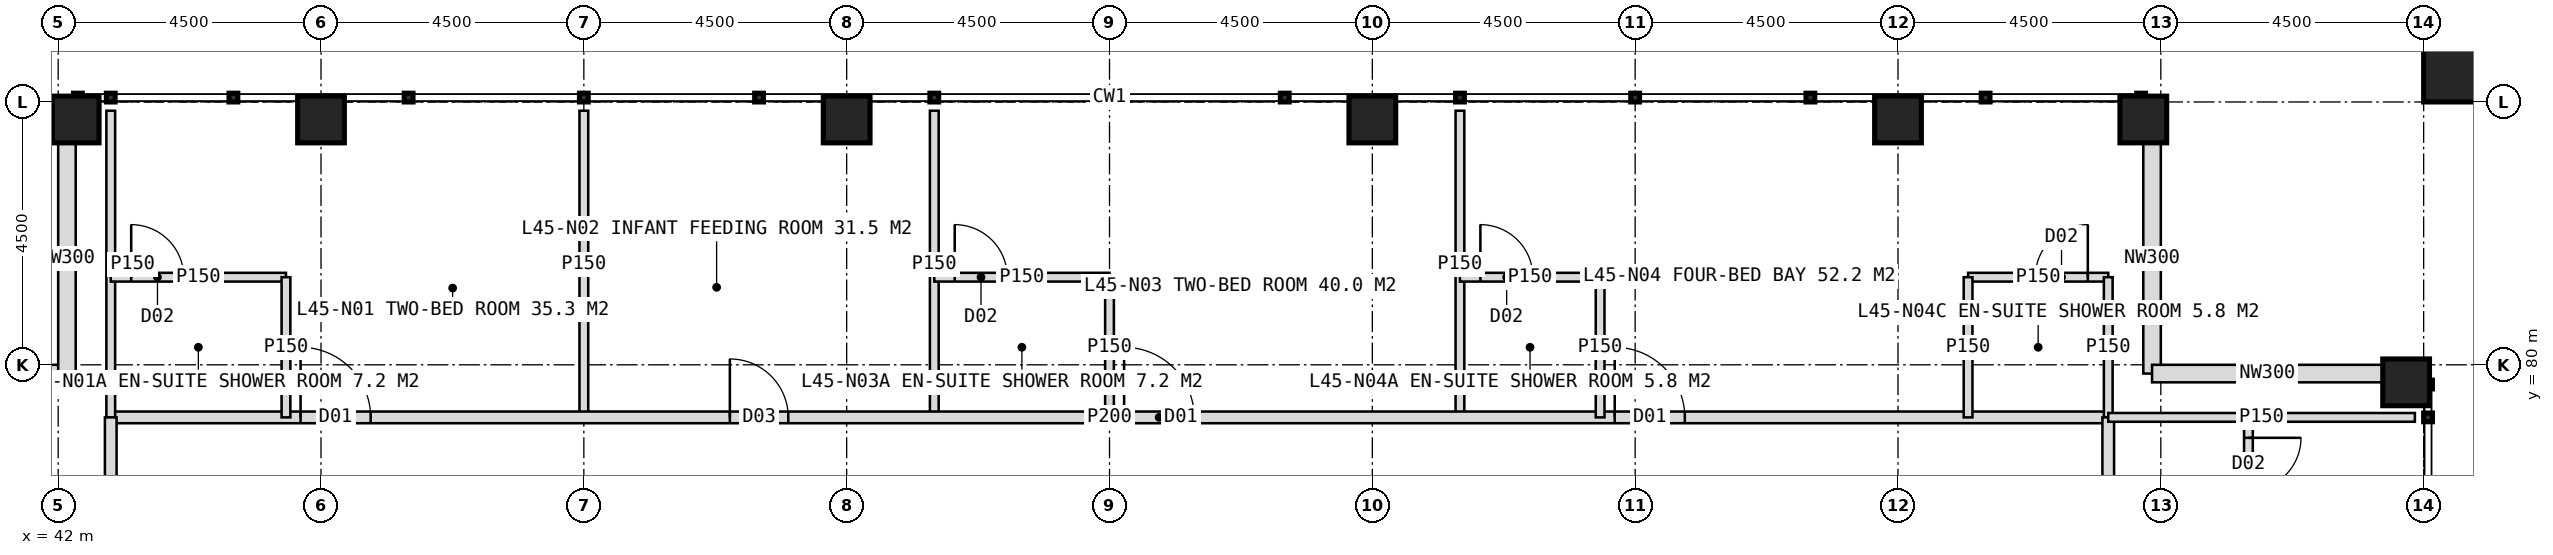
"""IFC4 building model, lengths in metres.
Left out: names, types, materials, properties, quantities, classifications, styles, units other than length and angle.
Written with IfcOpenShell. Run it as: python <this file> out.ifc"""

import sys

from ifc_helpers import new_model, si_unit, direction, frame, frame_2d, origin, origin_2d, place, context, subcontext, project, spatial, rectangle, hollow_rectangle, extrude, element, fill, save


model = new_model("IFC4")
c1 = context("Model", 3, precision=1e-05, world=origin(), true_north=direction((0.0, 1.0)))
c2 = subcontext(c1, "Body", "Model", "MODEL_VIEW")
j1 = project(units=[si_unit("LENGTHUNIT", "METRE"), si_unit("PLANEANGLEUNIT", "RADIAN")], contexts=[c1])
p1 = place(None, origin())
s1 = spatial("IfcSite", under=j1, at=p1, CompositionType="ELEMENT")
p2 = place(p1, origin())
s2 = spatial("IfcBuilding", under=s1, at=p2, CompositionType="ELEMENT")
p3 = place(p2, frame((0.0, 0.0, 189.0)))
s3 = spatial("IfcBuildingStorey", under=s2, at=p3, CompositionType="ELEMENT", Elevation=189.0)
for number, where, z_axis, x_axis in (
    (1, (42.3, 84.2, 0.0), (0.0, 0.0, 1.0), (1.0, 0.0, 0.0)),
    (2, (46.5, 84.2, 0.0), (0.0, 0.0, 1.0), (1.0, 0.0, 0.0)),
    (3, (55.5, 84.2, 0.0), (0.0, 0.0, 1.0), (1.0, 0.0, 0.0)),
    (4, (64.5, 84.2, 0.0), (0.0, 0.0, 1.0), (1.0, 0.0, 0.0)),
    (5, (73.5, 84.2, 0.0), (0.0, 0.0, 1.0), (1.0, 0.0, 0.0)),
    (6, (77.7, 84.2, 0.0), (0.0, 0.0, 1.0), (1.0, 0.0, 0.0)),
    (7, (82.2, 79.7, 0.0), (0.0, 0.0, 1.0), (1.0, 0.0, 0.0)),
):
    element("IfcColumn", number, at=place(p3, frame(where, z_axis=z_axis, x_axis=x_axis)), inside=s3, PredefinedType="COLUMN", context=c2, shape_type="SweptSolid", body=[
        extrude(hollow_rectangle(XDim=0.8, YDim=0.8, WallThickness=0.08, at=origin_2d()), origin(), (0.0, 0.0, 1.0), 4.0),
    ])
p4 = place(p3, frame((83.1, 85.1, 0.0), z_axis=(0.0, 0.0, 1.0), x_axis=(1.0, 0.0, 0.0)))
e8 = element("IfcColumn", 8, at=p4, inside=s3, PredefinedType="COLUMN", context=c2, shape_type="SweptSolid", body=[
    extrude(hollow_rectangle(XDim=1.2, YDim=1.2, WallThickness=0.07, at=origin_2d()), origin(), (0.0, 0.0, 1.0), 4.0),
])
for number, where, z_axis, x_axis in (
    (9, (77.85, 83.8, 0.0), (0.0, 0.0, 1.0), (0.0, -1.0, 0.0)),
    (10, (77.85, 79.85, 0.0), (0.0, 0.0, 1.0), (1.0, 0.0, 0.0)),
    (11, (38.2, 79.85, 0.0), (0.0, 0.0, 1.0), (1.0, 0.0, 0.0)),
    (12, (42.15, 79.85, 0.0), (0.0, 0.0, 1.0), (0.0, 1.0, 0.0)),
):
    element("IfcWall", number, at=place(p3, frame(where, z_axis=z_axis, x_axis=x_axis)), inside=s3, PredefinedType="ELEMENTEDWALL", context=c2, shape_type="SweptSolid", body=[
        extrude(rectangle(XDim=3.95, YDim=0.3, at=frame_2d((1.975, 0.0))), origin(), (0.0, 0.0, 1.0), 2.85),
    ])
for number, where, z_axis, x_axis in (
    (13, (51.0, 79.1, 0.0), (0.0, 0.0, 1.0), (0.0, 1.0, 0.0)),
    (14, (57.0, 79.1, 0.0), (0.0, 0.0, 1.0), (0.0, 1.0, 0.0)),
    (15, (66.0, 79.1, 0.0), (0.0, 0.0, 1.0), (0.0, 1.0, 0.0)),
):
    element("IfcWall", number, at=place(p3, frame(where, z_axis=z_axis, x_axis=x_axis)), inside=s3, PredefinedType="PARTITIONING", context=c2, shape_type="SweptSolid", body=[
        extrude(rectangle(XDim=5.25, YDim=0.15, at=frame_2d((2.625, 0.0))), origin(), (0.0, 0.0, 1.0), 3.75),
    ])
p5 = place(p3, frame((42.9, 79.1, 0.0), z_axis=(0.0, 0.0, 1.0), x_axis=(1.0, 0.0, 0.0)))
e16 = element("IfcWall", 16, at=p5, inside=s3, PredefinedType="PARTITIONING", context=c2, shape_type="SweptSolid", body=[
    extrude(rectangle(XDim=34.2, YDim=0.2, at=frame_2d((17.1, 0.0))), origin(), (0.0, 0.0, 1.0), 3.75),
])
p6 = place(p5, frame((3.25, 0.0, 0.0)))
e17 = element("IfcOpeningElement", 17, at=p6, cuts=e16, PredefinedType="OPENING", context=c2, shape_type="SweptSolid", body=[
    extrude(rectangle(XDim=1.2, YDim=2.2, at=frame_2d((0.6, 1.1))), frame((0.0, 0.11, 0.0), z_axis=(0.0, -1.0, 0.0), x_axis=(1.0, 0.0, 0.0)), (0.0, 0.0, 1.0), 0.22),
])
p7 = place(p5, frame((10.6, 0.0, 0.0)))
e18 = element("IfcOpeningElement", 18, at=p7, cuts=e16, PredefinedType="OPENING", context=c2, shape_type="SweptSolid", body=[
    extrude(rectangle(XDim=1.0, YDim=2.1, at=frame_2d((0.5, 1.05))), frame((0.0, 0.11, 0.0), z_axis=(0.0, -1.0, 0.0), x_axis=(1.0, 0.0, 0.0)), (0.0, 0.0, 1.0), 0.22),
])
p8 = place(p5, frame((17.35, 0.0, 0.0)))
e19 = element("IfcOpeningElement", 19, at=p8, cuts=e16, PredefinedType="OPENING", context=c2, shape_type="SweptSolid", body=[
    extrude(rectangle(XDim=1.2, YDim=2.2, at=frame_2d((0.6, 1.1))), frame((0.0, 0.11, 0.0), z_axis=(0.0, -1.0, 0.0), x_axis=(1.0, 0.0, 0.0)), (0.0, 0.0, 1.0), 0.22),
])
p9 = place(p5, frame((25.75, 0.0, 0.0)))
e20 = element("IfcOpeningElement", 20, at=p9, cuts=e16, PredefinedType="OPENING", context=c2, shape_type="SweptSolid", body=[
    extrude(rectangle(XDim=1.2, YDim=2.2, at=frame_2d((0.6, 1.1))), frame((0.0, 0.11, 0.0), z_axis=(0.0, -1.0, 0.0), x_axis=(1.0, 0.0, 0.0)), (0.0, 0.0, 1.0), 0.22),
])
p10 = place(p3, frame((42.9, 79.1, 0.0), z_axis=(0.0, 0.0, 1.0), x_axis=(0.0, 1.0, 0.0)))
e21 = element("IfcWall", 21, at=p10, inside=s3, PredefinedType="PARTITIONING", context=c2, shape_type="SweptSolid", body=[
    extrude(rectangle(XDim=5.25, YDim=0.15, at=frame_2d((2.625, 0.0))), origin(), (0.0, 0.0, 1.0), 3.75),
])
p11 = place(p3, frame((42.9, 81.5, 0.0), z_axis=(0.0, 0.0, 1.0), x_axis=(1.0, 0.0, 0.0)))
e22 = element("IfcWall", 22, at=p11, inside=s3, PredefinedType="PARTITIONING", context=c2, shape_type="SweptSolid", body=[
    extrude(rectangle(XDim=3.0, YDim=0.15, at=frame_2d((1.5, 0.0))), origin(), (0.0, 0.0, 1.0), 3.75),
])
p12 = place(p11, frame((0.35, 0.0, 0.0)))
e23 = element("IfcOpeningElement", 23, at=p12, cuts=e22, PredefinedType="OPENING", context=c2, shape_type="SweptSolid", body=[
    extrude(rectangle(XDim=0.9, YDim=2.1, at=frame_2d((0.45, 1.05))), frame((0.0, 0.085, 0.0), z_axis=(0.0, -1.0, 0.0), x_axis=(1.0, 0.0, 0.0)), (0.0, 0.0, 1.0), 0.17),
])
p13 = place(p3, frame((45.9, 79.1, 0.0), z_axis=(0.0, 0.0, 1.0), x_axis=(0.0, 1.0, 0.0)))
e24 = element("IfcWall", 24, at=p13, inside=s3, PredefinedType="PARTITIONING", context=c2, shape_type="SweptSolid", body=[
    extrude(rectangle(XDim=2.4, YDim=0.15, at=frame_2d((1.2, 0.0))), origin(), (0.0, 0.0, 1.0), 3.75),
])
p14 = place(p3, frame((57.0, 81.5, 0.0), z_axis=(0.0, 0.0, 1.0), x_axis=(1.0, 0.0, 0.0)))
e25 = element("IfcWall", 25, at=p14, inside=s3, PredefinedType="PARTITIONING", context=c2, shape_type="SweptSolid", body=[
    extrude(rectangle(XDim=3.0, YDim=0.15, at=frame_2d((1.5, 0.0))), origin(), (0.0, 0.0, 1.0), 3.75),
])
p15 = place(p14, frame((0.35, 0.0, 0.0)))
e26 = element("IfcOpeningElement", 26, at=p15, cuts=e25, PredefinedType="OPENING", context=c2, shape_type="SweptSolid", body=[
    extrude(rectangle(XDim=0.9, YDim=2.1, at=frame_2d((0.45, 1.05))), frame((0.0, 0.085, 0.0), z_axis=(0.0, -1.0, 0.0), x_axis=(1.0, 0.0, 0.0)), (0.0, 0.0, 1.0), 0.17),
])
p16 = place(p3, frame((60.0, 79.1, 0.0), z_axis=(0.0, 0.0, 1.0), x_axis=(0.0, 1.0, 0.0)))
e27 = element("IfcWall", 27, at=p16, inside=s3, PredefinedType="PARTITIONING", context=c2, shape_type="SweptSolid", body=[
    extrude(rectangle(XDim=2.4, YDim=0.15, at=frame_2d((1.2, 0.0))), origin(), (0.0, 0.0, 1.0), 2.95),
])
p17 = place(p3, frame((66.0, 81.5, 0.0), z_axis=(0.0, 0.0, 1.0), x_axis=(1.0, 0.0, 0.0)))
e28 = element("IfcWall", 28, at=p17, inside=s3, PredefinedType="PARTITIONING", context=c2, shape_type="SweptSolid", body=[
    extrude(rectangle(XDim=2.4, YDim=0.15, at=frame_2d((1.2, 0.0))), origin(), (0.0, 0.0, 1.0), 3.75),
])
p18 = place(p17, frame((0.35, 0.0, 0.0)))
e29 = element("IfcOpeningElement", 29, at=p18, cuts=e28, PredefinedType="OPENING", context=c2, shape_type="SweptSolid", body=[
    extrude(rectangle(XDim=0.9, YDim=2.1, at=frame_2d((0.45, 1.05))), frame((0.0, 0.085, 0.0), z_axis=(0.0, -1.0, 0.0), x_axis=(1.0, 0.0, 0.0)), (0.0, 0.0, 1.0), 0.17),
])
p19 = place(p3, frame((68.4, 79.1, 0.0), z_axis=(0.0, 0.0, 1.0), x_axis=(0.0, 1.0, 0.0)))
e30 = element("IfcWall", 30, at=p19, inside=s3, PredefinedType="PARTITIONING", context=c2, shape_type="SweptSolid", body=[
    extrude(rectangle(XDim=2.4, YDim=0.15, at=frame_2d((1.2, 0.0))), origin(), (0.0, 0.0, 1.0), 3.75),
])
p20 = place(p3, frame((74.7, 81.5, 0.0), z_axis=(0.0, 0.0, 1.0), x_axis=(1.0, 0.0, 0.0)))
e31 = element("IfcWall", 31, at=p20, inside=s3, PredefinedType="PARTITIONING", context=c2, shape_type="SweptSolid", body=[
    extrude(rectangle(XDim=2.4, YDim=0.15, at=frame_2d((1.2, 0.0))), origin(), (0.0, 0.0, 1.0), 3.75),
])
p21 = place(p20, frame((1.15, 0.0, 0.0)))
e32 = element("IfcOpeningElement", 32, at=p21, cuts=e31, PredefinedType="OPENING", context=c2, shape_type="SweptSolid", body=[
    extrude(rectangle(XDim=0.9, YDim=2.1, at=frame_2d((0.45, 1.05))), frame((0.0, 0.085, 0.0), z_axis=(0.0, -1.0, 0.0), x_axis=(1.0, 0.0, 0.0)), (0.0, 0.0, 1.0), 0.17),
])
for number, where, z_axis, x_axis in (
    (33, (74.7, 79.1, 0.0), (0.0, 0.0, 1.0), (0.0, 1.0, 0.0)),
    (34, (77.1, 79.1, 0.0), (0.0, 0.0, 1.0), (0.0, 1.0, 0.0)),
):
    element("IfcWall", number, at=place(p3, frame(where, z_axis=z_axis, x_axis=x_axis)), inside=s3, PredefinedType="PARTITIONING", context=c2, shape_type="SweptSolid", body=[
        extrude(rectangle(XDim=2.4, YDim=0.15, at=frame_2d((1.2, 0.0))), origin(), (0.0, 0.0, 1.0), 3.75),
    ])
p22 = place(p3, frame((42.9, 44.9, 0.0), z_axis=(0.0, 0.0, 1.0), x_axis=(0.0, 1.0, 0.0)))
e35 = element("IfcWall", 35, at=p22, inside=s3, PredefinedType="PARTITIONING", context=c2, shape_type="SweptSolid", body=[
    extrude(rectangle(XDim=34.2, YDim=0.2, at=frame_2d((17.1, 0.0))), origin(), (0.0, 0.0, 1.0), 3.75),
])
p23 = place(p22, frame((3.25, 0.0, 0.0)))
e36 = element("IfcOpeningElement", 36, at=p23, cuts=e35, PredefinedType="OPENING", context=c2, shape_type="SweptSolid", body=[
    extrude(rectangle(XDim=1.2, YDim=2.2, at=frame_2d((0.6, 1.1))), frame((0.0, 0.11, 0.0), z_axis=(0.0, -1.0, 0.0), x_axis=(1.0, 0.0, 0.0)), (0.0, 0.0, 1.0), 0.22),
])
p24 = place(p22, frame((11.35, 0.0, 0.0)))
e37 = element("IfcOpeningElement", 37, at=p24, cuts=e35, PredefinedType="OPENING", context=c2, shape_type="SweptSolid", body=[
    extrude(rectangle(XDim=1.2, YDim=2.2, at=frame_2d((0.6, 1.1))), frame((0.0, 0.11, 0.0), z_axis=(0.0, -1.0, 0.0), x_axis=(1.0, 0.0, 0.0)), (0.0, 0.0, 1.0), 0.22),
])
p25 = place(p22, frame((20.35, 0.0, 0.0)))
e38 = element("IfcOpeningElement", 38, at=p25, cuts=e35, PredefinedType="OPENING", context=c2, shape_type="SweptSolid", body=[
    extrude(rectangle(XDim=1.2, YDim=2.2, at=frame_2d((0.6, 1.1))), frame((0.0, 0.11, 0.0), z_axis=(0.0, -1.0, 0.0), x_axis=(1.0, 0.0, 0.0)), (0.0, 0.0, 1.0), 0.22),
])
p26 = place(p22, frame((29.35, 0.0, 0.0)))
e39 = element("IfcOpeningElement", 39, at=p26, cuts=e35, PredefinedType="OPENING", context=c2, shape_type="SweptSolid", body=[
    extrude(rectangle(XDim=1.2, YDim=2.2, at=frame_2d((0.6, 1.1))), frame((0.0, 0.11, 0.0), z_axis=(0.0, -1.0, 0.0), x_axis=(1.0, 0.0, 0.0)), (0.0, 0.0, 1.0), 0.22),
])
p27 = place(p3, frame((77.1, 79.1, 0.0), z_axis=(0.0, 0.0, 1.0), x_axis=(0.0, -1.0, 0.0)))
e40 = element("IfcWall", 40, at=p27, inside=s3, PredefinedType="PARTITIONING", context=c2, shape_type="SweptSolid", body=[
    extrude(rectangle(XDim=34.2, YDim=0.2, at=frame_2d((17.1, 0.0))), origin(), (0.0, 0.0, 1.0), 3.75),
])
p28 = place(p27, frame((3.25, 0.0, 0.0)))
e41 = element("IfcOpeningElement", 41, at=p28, cuts=e40, PredefinedType="OPENING", context=c2, shape_type="SweptSolid", body=[
    extrude(rectangle(XDim=1.2, YDim=2.2, at=frame_2d((0.6, 1.1))), frame((0.0, 0.11, 0.0), z_axis=(0.0, -1.0, 0.0), x_axis=(1.0, 0.0, 0.0)), (0.0, 0.0, 1.0), 0.22),
])
p29 = place(p27, frame((11.35, 0.0, 0.0)))
e42 = element("IfcOpeningElement", 42, at=p29, cuts=e40, PredefinedType="OPENING", context=c2, shape_type="SweptSolid", body=[
    extrude(rectangle(XDim=1.2, YDim=2.2, at=frame_2d((0.6, 1.1))), frame((0.0, 0.11, 0.0), z_axis=(0.0, -1.0, 0.0), x_axis=(1.0, 0.0, 0.0)), (0.0, 0.0, 1.0), 0.22),
])
p30 = place(p27, frame((19.75, 0.0, 0.0)))
e43 = element("IfcOpeningElement", 43, at=p30, cuts=e40, PredefinedType="OPENING", context=c2, shape_type="SweptSolid", body=[
    extrude(rectangle(XDim=1.2, YDim=2.2, at=frame_2d((0.6, 1.1))), frame((0.0, 0.11, 0.0), z_axis=(0.0, -1.0, 0.0), x_axis=(1.0, 0.0, 0.0)), (0.0, 0.0, 1.0), 0.22),
])
p31 = place(p27, frame((25.75, 0.0, 0.0)))
e44 = element("IfcOpeningElement", 44, at=p31, cuts=e40, PredefinedType="OPENING", context=c2, shape_type="SweptSolid", body=[
    extrude(rectangle(XDim=1.2, YDim=2.2, at=frame_2d((0.6, 1.1))), frame((0.0, 0.11, 0.0), z_axis=(0.0, -1.0, 0.0), x_axis=(1.0, 0.0, 0.0)), (0.0, 0.0, 1.0), 0.22),
])
p32 = place(p3, frame((77.1, 79.1, 0.0), z_axis=(0.0, 0.0, 1.0), x_axis=(1.0, 0.0, 0.0)))
e45 = element("IfcWall", 45, at=p32, inside=s3, PredefinedType="PARTITIONING", context=c2, shape_type="SweptSolid", body=[
    extrude(rectangle(XDim=5.25, YDim=0.15, at=frame_2d((2.625, 0.0))), origin(), (0.0, 0.0, 1.0), 3.75),
])
p33 = place(p3, frame((79.5, 79.1, 0.0), z_axis=(0.0, 0.0, 1.0), x_axis=(0.0, -1.0, 0.0)))
e46 = element("IfcWall", 46, at=p33, inside=s3, PredefinedType="PARTITIONING", context=c2, shape_type="SweptSolid", body=[
    extrude(rectangle(XDim=3.0, YDim=0.15, at=frame_2d((1.5, 0.0))), origin(), (0.0, 0.0, 1.0), 3.75),
])
p34 = place(p33, frame((0.35, 0.0, 0.0)))
e47 = element("IfcOpeningElement", 47, at=p34, cuts=e46, PredefinedType="OPENING", context=c2, shape_type="SweptSolid", body=[
    extrude(rectangle(XDim=0.9, YDim=2.1, at=frame_2d((0.45, 1.05))), frame((0.0, 0.085, 0.0), z_axis=(0.0, -1.0, 0.0), x_axis=(1.0, 0.0, 0.0)), (0.0, 0.0, 1.0), 0.17),
])
p35 = place(p6, origin())
e48 = element("IfcDoor", 48, at=p35, inside=s3, OperationType="SINGLE_SWING_LEFT", PredefinedType="DOOR", context=c2, shape_type="SweptSolid", body=[
    extrude(rectangle(XDim=1.2, YDim=2.2, at=frame_2d((0.6, 1.1))), frame((0.0, 0.025, 0.0), z_axis=(0.0, -1.0, 0.0), x_axis=(1.0, 0.0, 0.0)), (0.0, 0.0, 1.0), 0.05),
])
fill(e17, e48)
p36 = place(p12, origin())
e49 = element("IfcDoor", 49, at=p36, inside=s3, OperationType="SINGLE_SWING_LEFT", PredefinedType="DOOR", context=c2, shape_type="SweptSolid", body=[
    extrude(rectangle(XDim=0.9, YDim=2.1, at=frame_2d((0.45, 1.05))), frame((0.0, 0.025, 0.0), z_axis=(0.0, -1.0, 0.0), x_axis=(1.0, 0.0, 0.0)), (0.0, 0.0, 1.0), 0.05),
])
fill(e23, e49)
p37 = place(p7, origin())
e50 = element("IfcDoor", 50, at=p37, inside=s3, OperationType="SINGLE_SWING_LEFT", PredefinedType="DOOR", context=c2, shape_type="SweptSolid", body=[
    extrude(rectangle(XDim=1.0, YDim=2.1, at=frame_2d((0.5, 1.05))), frame((0.0, 0.025, 0.0), z_axis=(0.0, -1.0, 0.0), x_axis=(1.0, 0.0, 0.0)), (0.0, 0.0, 1.0), 0.05),
])
fill(e18, e50)
p38 = place(p8, origin())
e51 = element("IfcDoor", 51, at=p38, inside=s3, OperationType="SINGLE_SWING_LEFT", PredefinedType="DOOR", context=c2, shape_type="SweptSolid", body=[
    extrude(rectangle(XDim=1.2, YDim=2.2, at=frame_2d((0.6, 1.1))), frame((0.0, 0.025, 0.0), z_axis=(0.0, -1.0, 0.0), x_axis=(1.0, 0.0, 0.0)), (0.0, 0.0, 1.0), 0.05),
])
fill(e19, e51)
p39 = place(p15, origin())
e52 = element("IfcDoor", 52, at=p39, inside=s3, OperationType="SINGLE_SWING_LEFT", PredefinedType="DOOR", context=c2, shape_type="SweptSolid", body=[
    extrude(rectangle(XDim=0.9, YDim=2.1, at=frame_2d((0.45, 1.05))), frame((0.0, 0.025, 0.0), z_axis=(0.0, -1.0, 0.0), x_axis=(1.0, 0.0, 0.0)), (0.0, 0.0, 1.0), 0.05),
])
fill(e26, e52)
p40 = place(p9, origin())
e53 = element("IfcDoor", 53, at=p40, inside=s3, OperationType="SINGLE_SWING_LEFT", PredefinedType="DOOR", context=c2, shape_type="SweptSolid", body=[
    extrude(rectangle(XDim=1.2, YDim=2.2, at=frame_2d((0.6, 1.1))), frame((0.0, 0.025, 0.0), z_axis=(0.0, -1.0, 0.0), x_axis=(1.0, 0.0, 0.0)), (0.0, 0.0, 1.0), 0.05),
])
fill(e20, e53)
p41 = place(p18, origin())
e54 = element("IfcDoor", 54, at=p41, inside=s3, OperationType="SINGLE_SWING_LEFT", PredefinedType="DOOR", context=c2, shape_type="SweptSolid", body=[
    extrude(rectangle(XDim=0.9, YDim=2.1, at=frame_2d((0.45, 1.05))), frame((0.0, 0.025, 0.0), z_axis=(0.0, -1.0, 0.0), x_axis=(1.0, 0.0, 0.0)), (0.0, 0.0, 1.0), 0.05),
])
fill(e29, e54)
p42 = place(p21, origin())
e55 = element("IfcDoor", 55, at=p42, inside=s3, OperationType="SINGLE_SWING_RIGHT", PredefinedType="DOOR", context=c2, shape_type="SweptSolid", body=[
    extrude(rectangle(XDim=0.9, YDim=2.1, at=frame_2d((0.45, 1.05))), frame((0.0, 0.025, 0.0), z_axis=(0.0, -1.0, 0.0), x_axis=(1.0, 0.0, 0.0)), (0.0, 0.0, 1.0), 0.05),
])
fill(e32, e55)
p43 = place(p34, origin())
e56 = element("IfcDoor", 56, at=p43, inside=s3, OperationType="SINGLE_SWING_LEFT", PredefinedType="DOOR", context=c2, shape_type="SweptSolid", body=[
    extrude(rectangle(XDim=0.9, YDim=2.1, at=frame_2d((0.45, 1.05))), frame((0.0, 0.025, 0.0), z_axis=(0.0, -1.0, 0.0), x_axis=(1.0, 0.0, 0.0)), (0.0, 0.0, 1.0), 0.05),
])
fill(e47, e56)
save(model, sys.argv[1])
